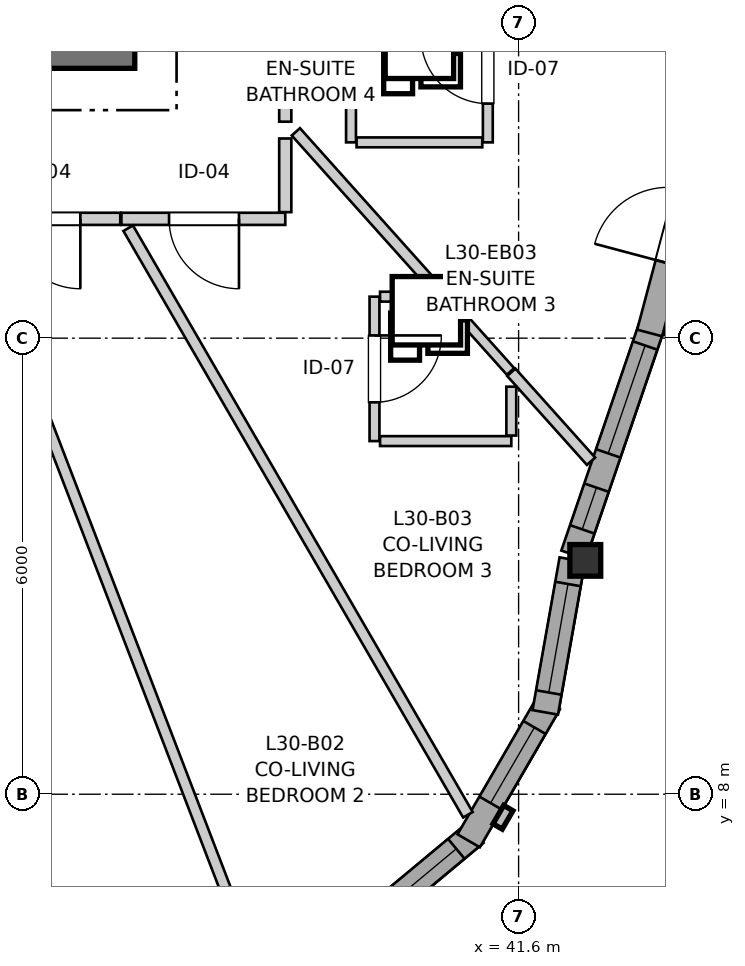
"""IFC4 building model, lengths in metres.
Left out: names, types, materials, properties, quantities, classifications, styles, units other than length and angle.
Written with IfcOpenShell. Run it as: python <this file> out.ifc"""

import sys

from ifc_helpers import new_model, si_unit, direction, frame, frame_2d, origin, origin_2d, place, context, subcontext, project, spatial, rectangle, i_section, extrude, source, transform, mapped, element, fill, save


model = new_model("IFC4")
c1 = context("Model", 3, precision=1e-05, world=origin(), true_north=direction((0.0, 1.0)))
c2 = subcontext(c1, "Body", "Model", "MODEL_VIEW")
j1 = project(units=[si_unit("LENGTHUNIT", "METRE"), si_unit("PLANEANGLEUNIT", "RADIAN")], contexts=[c1])
p1 = place(None, origin())
s1 = spatial("IfcSite", under=j1, at=p1, CompositionType="ELEMENT")
p2 = place(p1, origin())
s2 = spatial("IfcBuilding", under=s1, at=p2, CompositionType="ELEMENT")
p3 = place(p2, frame((0.0, 0.0, 102.4)))
s3 = spatial("IfcBuildingStorey", under=s2, at=p3, CompositionType="ELEMENT", Elevation=102.4)
p4 = place(p3, frame((24.15, 17.875, 0.0), z_axis=(0.0, 0.0, 1.0), x_axis=(1.0, 0.0, 0.0)))
e1 = element("IfcWall", 1, at=p4, inside=s3, PredefinedType="SHEAR", context=c2, shape_type="SweptSolid", body=[
    extrude(rectangle(XDim=12.4, YDim=0.65, at=frame_2d((6.2, 0.0))), origin(), (0.0, 0.0, 1.0), 2.95),
])
m1 = source(origin(), c2, "Body", "SweptSolid", [
    extrude(i_section(OverallWidth=0.406, OverallDepth=0.416, WebThickness=0.027, FlangeThickness=0.044, FilletRadius=0.015, at=origin_2d()), origin(), (0.0, 0.0, 1.0), 2.95),
])
p5 = place(p3, frame((42.478, 11.077, 0.0), z_axis=(0.0, 0.0, 1.0), x_axis=(1.0, 0.0, 0.0)))
e2 = element("IfcColumn", 2, at=p5, inside=s3, PredefinedType="PILASTER", context=c2, shape_type="MappedRepresentation", body=[
    mapped(m1, transform((0.0, 0.0, 0.0), x_axis=(1.0, 0.0, 0.0), y_axis=(0.0, 1.0, 0.0), z_axis=(0.0, 0.0, 1.0), scale=1.0)),
])
p6 = place(p3, frame((39.417, 6.147, 0.0), z_axis=(0.0, 0.0, 1.0), x_axis=(0.768497696041, 0.639852554249, 0.0)))
e3 = element("IfcWall", 3, at=p6, inside=s3, PredefinedType="SOLIDWALL", context=c2, shape_type="SweptSolid", body=[
    extrude(rectangle(XDim=2.099, YDim=0.34, at=frame_2d((1.049, 0.0))), origin(), (0.0, 0.0, 1.0), 2.48),
])
p7 = place(p6, frame((0.324, 0.0, 0.82)))
e4 = element("IfcOpeningElement", 4, at=p7, cuts=e3, PredefinedType="OPENING", context=c2, shape_type="SweptSolid", body=[
    extrude(rectangle(XDim=1.45, YDim=1.25, at=frame_2d((0.725, 0.625))), frame((0.0, 0.18, 0.0), z_axis=(0.0, -1.0, 0.0), x_axis=(1.0, 0.0, 0.0)), (0.0, 0.0, 1.0), 0.36),
])
p8 = place(p3, frame((40.943, 7.387, 0.0), z_axis=(0.0, 0.0, 1.0), x_axis=(0.501902596059, 0.864924149315, 0.0)))
e5 = element("IfcWall", 5, at=p8, inside=s3, PredefinedType="SOLIDWALL", context=c2, shape_type="SweptSolid", body=[
    extrude(rectangle(XDim=2.099, YDim=0.34, at=frame_2d((1.049, 0.0))), origin(), (0.0, 0.0, 1.0), 2.48),
])
p9 = place(p8, frame((0.574, 0.0, 0.82)))
e6 = element("IfcOpeningElement", 6, at=p9, cuts=e5, PredefinedType="OPENING", context=c2, shape_type="SweptSolid", body=[
    extrude(rectangle(XDim=1.15, YDim=1.2, at=frame_2d((0.575, 0.6))), frame((0.0, 0.18, 0.0), z_axis=(0.0, -1.0, 0.0), x_axis=(1.0, 0.0, 0.0)), (0.0, 0.0, 1.0), 0.36),
])
p10 = place(p3, frame((41.951, 9.077, 0.0), z_axis=(0.0, 0.0, 1.0), x_axis=(0.174399433509, 0.984674990843, 0.0)))
e7 = element("IfcWall", 7, at=p10, inside=s3, PredefinedType="SOLIDWALL", context=c2, shape_type="SweptSolid", body=[
    extrude(rectangle(XDim=2.041, YDim=0.34, at=frame_2d((1.021, 0.0))), origin(), (0.0, 0.0, 1.0), 2.48),
])
p11 = place(p10, frame((0.265, 0.0, 0.82)))
e8 = element("IfcOpeningElement", 8, at=p11, cuts=e7, PredefinedType="OPENING", context=c2, shape_type="SweptSolid", body=[
    extrude(rectangle(XDim=1.45, YDim=1.25, at=frame_2d((0.725, 0.625))), frame((0.0, 0.18, 0.0), z_axis=(0.0, -1.0, 0.0), x_axis=(1.0, 0.0, 0.0)), (0.0, 0.0, 1.0), 0.36),
])
p12 = place(p3, frame((42.323, 11.151, 0.0), z_axis=(0.0, 0.0, 1.0), x_axis=(0.323606092462, 0.94619189223, 0.0)))
e9 = element("IfcWall", 9, at=p12, inside=s3, PredefinedType="SOLIDWALL", context=c2, shape_type="SweptSolid", body=[
    extrude(rectangle(XDim=3.172, YDim=0.34, at=frame_2d((1.586, 0.0))), origin(), (0.0, 0.0, 1.0), 2.48),
])
p13 = place(p12, frame((0.353, 0.0, 0.82)))
e10 = element("IfcOpeningElement", 10, at=p13, cuts=e9, PredefinedType="OPENING", context=c2, shape_type="SweptSolid", body=[
    extrude(rectangle(XDim=0.58, YDim=1.35, at=frame_2d((0.29, 0.675))), frame((0.0, 0.18, 0.0), z_axis=(0.0, -1.0, 0.0), x_axis=(1.0, 0.0, 0.0)), (0.0, 0.0, 1.0), 0.36),
])
p14 = place(p12, frame((1.41, 0.0, 0.82)))
e11 = element("IfcOpeningElement", 11, at=p14, cuts=e9, PredefinedType="OPENING", context=c2, shape_type="SweptSolid", body=[
    extrude(rectangle(XDim=1.5, YDim=1.45, at=frame_2d((0.75, 0.725))), frame((0.0, 0.18, 0.0), z_axis=(0.0, -1.0, 0.0), x_axis=(1.0, 0.0, 0.0)), (0.0, 0.0, 1.0), 0.36),
])
p15 = place(p3, frame((43.324, 14.068, 0.0), z_axis=(0.0, 0.0, 1.0), x_axis=(0.257085513118, 0.966388658328, 0.0)))
e12 = element("IfcWall", 12, at=p15, inside=s3, PredefinedType="SOLIDWALL", context=c2, shape_type="SweptSolid", body=[
    extrude(rectangle(XDim=2.896, YDim=0.34, at=frame_2d((1.448, 0.0))), origin(), (0.0, 0.0, 1.0), 2.48),
])
p16 = place(p15, frame((0.948, 0.0, 0.0)))
e13 = element("IfcOpeningElement", 13, at=p16, cuts=e12, PredefinedType="OPENING", context=c2, shape_type="SweptSolid", body=[
    extrude(rectangle(XDim=1.0, YDim=2.1, at=frame_2d((0.5, 1.05))), frame((0.0, 0.18, 0.0), z_axis=(0.0, -1.0, 0.0), x_axis=(1.0, 0.0, 0.0)), (0.0, 0.0, 1.0), 0.36),
])
p17 = place(p3, frame((38.53, 23.005, 0.0), z_axis=(0.0, 0.0, 1.0), x_axis=(0.0, -1.0, 0.0)))
e14 = element("IfcWall", 14, at=p17, inside=s3, PredefinedType="PARTITIONING", context=c2, shape_type="SweptSolid", body=[
    extrude(rectangle(XDim=6.157, YDim=0.16, at=frame_2d((3.079, 0.0))), origin(), (0.0, 0.0, 1.0), 2.95),
])
p18 = place(p17, frame((2.615, 0.0, 0.0)))
e15 = element("IfcOpeningElement", 15, at=p18, cuts=e14, PredefinedType="OPENING", context=c2, shape_type="SweptSolid", body=[
    extrude(rectangle(XDim=0.92, YDim=2.1, at=frame_2d((0.46, 1.05))), frame((0.0, 0.09, 0.0), z_axis=(0.0, -1.0, 0.0), x_axis=(1.0, 0.0, 0.0)), (0.0, 0.0, 1.0), 0.18),
])
p19 = place(p3, frame((38.53, 15.57, 0.0), z_axis=(0.0, 0.0, 1.0), x_axis=(-1.0, 0.0, 0.0)))
e16 = element("IfcWall", 16, at=p19, inside=s3, PredefinedType="PARTITIONING", context=c2, shape_type="SweptSolid", body=[
    extrude(rectangle(XDim=2.156, YDim=0.16, at=frame_2d((1.078, 0.0))), origin(), (0.0, 0.0, 1.0), 2.95),
])
p20 = place(p19, frame((0.609, 0.0, 0.0)))
e17 = element("IfcOpeningElement", 17, at=p20, cuts=e16, PredefinedType="OPENING", context=c2, shape_type="SweptSolid", body=[
    extrude(rectangle(XDim=0.92, YDim=2.1, at=frame_2d((0.46, 1.05))), frame((0.0, 0.09, 0.0), z_axis=(0.0, -1.0, 0.0), x_axis=(1.0, 0.0, 0.0)), (0.0, 0.0, 1.0), 0.18),
])
p21 = place(p3, frame((36.359, 15.57, 0.0), z_axis=(0.0, 0.0, 1.0), x_axis=(-1.0, 0.0, 0.0)))
e18 = element("IfcWall", 18, at=p21, inside=s3, PredefinedType="PARTITIONING", context=c2, shape_type="SweptSolid", body=[
    extrude(rectangle(XDim=1.971, YDim=0.16, at=frame_2d((0.985, 0.0))), origin(), (0.0, 0.0, 1.0), 2.95),
])
p22 = place(p21, frame((0.525, 0.0, 0.0)))
e19 = element("IfcOpeningElement", 19, at=p22, cuts=e18, PredefinedType="OPENING", context=c2, shape_type="SweptSolid", body=[
    extrude(rectangle(XDim=0.92, YDim=2.1, at=frame_2d((0.46, 1.05))), frame((0.0, 0.09, 0.0), z_axis=(0.0, -1.0, 0.0), x_axis=(1.0, 0.0, 0.0)), (0.0, 0.0, 1.0), 0.18),
])
p23 = place(p3, frame((39.704, 14.546, 0.0), z_axis=(0.0, 0.0, 1.0), x_axis=(0.0, -1.0, 0.0)))
e20 = element("IfcWall", 20, at=p23, inside=s3, PredefinedType="PARTITIONING", context=c2, shape_type="SweptSolid", body=[
    extrude(rectangle(XDim=1.9, YDim=0.13, at=frame_2d((0.95, 0.0))), origin(), (0.0, 0.0, 1.0), 2.95),
])
p24 = place(p23, frame((0.51, 0.0, 0.0)))
e21 = element("IfcOpeningElement", 21, at=p24, cuts=e20, PredefinedType="OPENING", context=c2, shape_type="SweptSolid", body=[
    extrude(rectangle(XDim=0.88, YDim=2.05, at=frame_2d((0.44, 1.025))), frame((0.0, 0.075, 0.0), z_axis=(0.0, -1.0, 0.0), x_axis=(1.0, 0.0, 0.0)), (0.0, 0.0, 1.0), 0.15),
])
p25 = place(p3, frame((41.195, 16.576, 0.0), z_axis=(0.0, 0.0, 1.0), x_axis=(0.0, 1.0, 0.0)))
e22 = element("IfcWall", 22, at=p25, inside=s3, PredefinedType="PARTITIONING", context=c2, shape_type="SweptSolid", body=[
    extrude(rectangle(XDim=1.9, YDim=0.13, at=frame_2d((0.95, 0.0))), origin(), (0.0, 0.0, 1.0), 2.95),
])
p26 = place(p25, frame((0.51, 0.0, 0.0)))
e23 = element("IfcOpeningElement", 23, at=p26, cuts=e22, PredefinedType="OPENING", context=c2, shape_type="SweptSolid", body=[
    extrude(rectangle(XDim=0.88, YDim=2.05, at=frame_2d((0.44, 1.025))), frame((0.0, 0.075, 0.0), z_axis=(0.0, -1.0, 0.0), x_axis=(1.0, 0.0, 0.0)), (0.0, 0.0, 1.0), 0.15),
])
p27 = place(p3, frame((34.4, 15.457, 0.0), z_axis=(0.0, 0.0, 1.0), x_axis=(0.358586620169, -0.933496457324, 0.0)))
e24 = element("IfcWall", 24, at=p27, inside=s3, PredefinedType="PARTITIONING", context=c2, shape_type="SweptSolid", body=[
    extrude(rectangle(XDim=10.256, YDim=0.145, at=frame_2d((5.128, 0.0))), origin(), (0.0, 0.0, 1.0), 2.95),
])
p28 = place(p3, frame((36.463, 15.447, 0.0), z_axis=(0.0, 0.0, 1.0), x_axis=(0.501201369888, -0.86533068062, 0.0)))
e25 = element("IfcWall", 25, at=p28, inside=s3, PredefinedType="PARTITIONING", context=c2, shape_type="SweptSolid", body=[
    extrude(rectangle(XDim=8.918, YDim=0.145, at=frame_2d((4.459, 0.0))), origin(), (0.0, 0.0, 1.0), 2.95),
])
p29 = place(p3, frame((38.669, 16.715, 0.0), z_axis=(0.0, 0.0, 1.0), x_axis=(0.667262858083, -0.744822313188, 0.0)))
e26 = element("IfcWall", 26, at=p29, inside=s3, PredefinedType="PARTITIONING", context=c2, shape_type="SweptSolid", body=[
    extrude(rectangle(XDim=2.912, YDim=0.145, at=frame_2d((1.456, 0.0))), origin(), (0.0, 0.0, 1.0), 2.95),
])
p30 = place(p3, frame((39.395, 16.576, 0.0), z_axis=(0.0, 0.0, 1.0), x_axis=(0.0, 1.0, 0.0)))
e27 = element("IfcWall", 27, at=p30, inside=s3, PredefinedType="PARTITIONING", context=c2, shape_type="SweptSolid", body=[
    extrude(rectangle(XDim=1.9, YDim=0.13, at=frame_2d((0.95, 0.0))), origin(), (0.0, 0.0, 1.0), 2.95),
])
p31 = place(p3, frame((39.777, 12.646, 0.0), z_axis=(0.0, 0.0, 1.0), x_axis=(1.0, 0.0, 0.0)))
e28 = element("IfcWall", 28, at=p31, inside=s3, PredefinedType="PARTITIONING", context=c2, shape_type="SweptSolid", body=[
    extrude(rectangle(XDim=1.727, YDim=0.13, at=frame_2d((0.863, 0.0))), origin(), (0.0, 0.0, 1.0), 2.95),
])
p32 = place(p3, frame((39.468, 16.576, 0.0), z_axis=(0.0, 0.0, 1.0), x_axis=(1.0, 0.0, 0.0)))
e29 = element("IfcWall", 29, at=p32, inside=s3, PredefinedType="PARTITIONING", context=c2, shape_type="SweptSolid", body=[
    extrude(rectangle(XDim=1.654, YDim=0.13, at=frame_2d((0.827, 0.0))), origin(), (0.0, 0.0, 1.0), 2.95),
])
p33 = place(p3, frame((41.504, 13.551, 0.0), z_axis=(0.0, 0.0, 1.0), x_axis=(0.667530166935, -0.744582753112, 0.0)))
e30 = element("IfcWall", 30, at=p33, inside=s3, PredefinedType="PARTITIONING", context=c2, shape_type="SweptSolid", body=[
    extrude(rectangle(XDim=1.572, YDim=0.145, at=frame_2d((0.786, 0.0))), origin(), (0.0, 0.0, 1.0), 2.95),
])
p34 = place(p3, frame((40.622, 14.535, 0.0), z_axis=(0.0, 0.0, 1.0), x_axis=(0.667455683483, -0.744649521981, 0.0)))
e31 = element("IfcWall", 31, at=p34, inside=s3, PredefinedType="PARTITIONING", context=c2, shape_type="SweptSolid", body=[
    extrude(rectangle(XDim=1.306, YDim=0.13, at=frame_2d((0.653, 0.0))), origin(), (0.0, 0.0, 1.0), 2.95),
])
p35 = place(p3, frame((38.53, 15.658, 0.0), z_axis=(0.0, 0.0, 1.0), x_axis=(0.0, 1.0, 0.0)))
e32 = element("IfcWall", 32, at=p35, inside=s3, PredefinedType="PARTITIONING", context=c2, shape_type="SweptSolid", body=[
    extrude(rectangle(XDim=0.969, YDim=0.16, at=frame_2d((0.484, 0.0))), origin(), (0.0, 0.0, 1.0), 2.95),
])
p36 = place(p3, frame((39.777, 14.546, 0.0), z_axis=(0.0, 0.0, 1.0), x_axis=(1.0, 0.0, 0.0)))
e33 = element("IfcWall", 33, at=p36, inside=s3, PredefinedType="PARTITIONING", context=c2, shape_type="SweptSolid", body=[
    extrude(rectangle(XDim=0.671, YDim=0.13, at=frame_2d((0.336, 0.0))), origin(), (0.0, 0.0, 1.0), 2.95),
])
p37 = place(p3, frame((41.504, 12.719, 0.0), z_axis=(0.0, 0.0, 1.0), x_axis=(0.0, 1.0, 0.0)))
e34 = element("IfcWall", 34, at=p37, inside=s3, PredefinedType="PARTITIONING", context=c2, shape_type="SweptSolid", body=[
    extrude(rectangle(XDim=0.643, YDim=0.13, at=frame_2d((0.321, 0.0))), origin(), (0.0, 0.0, 1.0), 2.95),
])
m2 = source(origin(), c2, "Body", "SweptSolid", [
    extrude(rectangle(XDim=1.45, YDim=1.25, at=frame_2d((0.725, 0.625))), frame((0.0, 0.03, 0.0), z_axis=(0.0, -1.0, 0.0), x_axis=(1.0, 0.0, 0.0)), (0.0, 0.0, 1.0), 0.06),
])
p38 = place(p7, origin())
e35 = element("IfcWindow", 35, at=p38, inside=s3, PartitioningType="SINGLE_PANEL", PredefinedType="WINDOW", context=c2, shape_type="MappedRepresentation", body=[
    mapped(m2, transform((0.0, 0.0, 0.0), x_axis=(1.0, 0.0, 0.0), y_axis=(0.0, 1.0, 0.0), z_axis=(0.0, 0.0, 1.0), scale=1.0)),
])
fill(e4, e35)
m3 = source(origin(), c2, "Body", "SweptSolid", [
    extrude(rectangle(XDim=1.15, YDim=1.2, at=frame_2d((0.575, 0.6))), frame((0.0, 0.03, 0.0), z_axis=(0.0, -1.0, 0.0), x_axis=(1.0, 0.0, 0.0)), (0.0, 0.0, 1.0), 0.06),
])
p39 = place(p9, origin())
e36 = element("IfcWindow", 36, at=p39, inside=s3, PartitioningType="SINGLE_PANEL", PredefinedType="WINDOW", context=c2, shape_type="MappedRepresentation", body=[
    mapped(m3, transform((0.0, 0.0, 0.0), x_axis=(1.0, 0.0, 0.0), y_axis=(0.0, 1.0, 0.0), z_axis=(0.0, 0.0, 1.0), scale=1.0)),
])
fill(e6, e36)
p40 = place(p11, origin())
e37 = element("IfcWindow", 37, at=p40, inside=s3, PartitioningType="SINGLE_PANEL", PredefinedType="WINDOW", context=c2, shape_type="MappedRepresentation", body=[
    mapped(m2, transform((0.0, 0.0, 0.0), x_axis=(1.0, 0.0, 0.0), y_axis=(0.0, 1.0, 0.0), z_axis=(0.0, 0.0, 1.0), scale=1.0)),
])
fill(e8, e37)
m4 = source(origin(), c2, "Body", "SweptSolid", [
    extrude(rectangle(XDim=0.58, YDim=1.35, at=frame_2d((0.29, 0.675))), frame((0.0, 0.03, 0.0), z_axis=(0.0, -1.0, 0.0), x_axis=(1.0, 0.0, 0.0)), (0.0, 0.0, 1.0), 0.06),
])
p41 = place(p13, origin())
e38 = element("IfcWindow", 38, at=p41, inside=s3, PartitioningType="SINGLE_PANEL", PredefinedType="WINDOW", context=c2, shape_type="MappedRepresentation", body=[
    mapped(m4, transform((0.0, 0.0, 0.0), x_axis=(1.0, 0.0, 0.0), y_axis=(0.0, 1.0, 0.0), z_axis=(0.0, 0.0, 1.0), scale=1.0)),
])
fill(e10, e38)
m5 = source(origin(), c2, "Body", "SweptSolid", [
    extrude(rectangle(XDim=1.5, YDim=1.45, at=frame_2d((0.75, 0.725))), frame((0.0, 0.03, 0.0), z_axis=(0.0, -1.0, 0.0), x_axis=(1.0, 0.0, 0.0)), (0.0, 0.0, 1.0), 0.06),
])
p42 = place(p14, origin())
e39 = element("IfcWindow", 39, at=p42, inside=s3, PartitioningType="SINGLE_PANEL", PredefinedType="WINDOW", context=c2, shape_type="MappedRepresentation", body=[
    mapped(m5, transform((0.0, 0.0, 0.0), x_axis=(1.0, 0.0, 0.0), y_axis=(0.0, 1.0, 0.0), z_axis=(0.0, 0.0, 1.0), scale=1.0)),
])
fill(e11, e39)
m6 = source(origin(), c2, "Body", "SweptSolid", [
    extrude(rectangle(XDim=0.92, YDim=2.1, at=frame_2d((0.46, 1.05))), frame((0.0, 0.025, 0.0), z_axis=(0.0, -1.0, 0.0), x_axis=(1.0, 0.0, 0.0)), (0.0, 0.0, 1.0), 0.05),
])
p43 = place(p20, origin())
e40 = element("IfcDoor", 40, at=p43, inside=s3, OperationType="SINGLE_SWING_LEFT", PredefinedType="DOOR", context=c2, shape_type="MappedRepresentation", body=[
    mapped(m6, transform((0.0, 0.0, 0.0), x_axis=(1.0, 0.0, 0.0), y_axis=(0.0, 1.0, 0.0), z_axis=(0.0, 0.0, 1.0), scale=1.0)),
])
fill(e17, e40)
p44 = place(p22, origin())
e41 = element("IfcDoor", 41, at=p44, inside=s3, OperationType="SINGLE_SWING_LEFT", PredefinedType="DOOR", context=c2, shape_type="MappedRepresentation", body=[
    mapped(m6, transform((0.0, 0.0, 0.0), x_axis=(1.0, 0.0, 0.0), y_axis=(0.0, 1.0, 0.0), z_axis=(0.0, 0.0, 1.0), scale=1.0)),
])
fill(e19, e41)
m7 = source(origin(), c2, "Body", "SweptSolid", [
    extrude(rectangle(XDim=0.88, YDim=2.05, at=frame_2d((0.44, 1.025))), frame((0.0, 0.025, 0.0), z_axis=(0.0, -1.0, 0.0), x_axis=(1.0, 0.0, 0.0)), (0.0, 0.0, 1.0), 0.05),
])
p45 = place(p24, origin())
e42 = element("IfcDoor", 42, at=p45, inside=s3, OperationType="SINGLE_SWING_LEFT", PredefinedType="DOOR", context=c2, shape_type="MappedRepresentation", body=[
    mapped(m7, transform((0.0, 0.0, 0.0), x_axis=(1.0, 0.0, 0.0), y_axis=(0.0, 1.0, 0.0), z_axis=(0.0, 0.0, 1.0), scale=1.0)),
])
fill(e21, e42)
p46 = place(p26, origin())
e43 = element("IfcDoor", 43, at=p46, inside=s3, OperationType="SINGLE_SWING_RIGHT", PredefinedType="DOOR", context=c2, shape_type="MappedRepresentation", body=[
    mapped(m7, transform((0.0, 0.0, 0.0), x_axis=(1.0, 0.0, 0.0), y_axis=(0.0, 1.0, 0.0), z_axis=(0.0, 0.0, 1.0), scale=1.0)),
])
fill(e23, e43)
save(model, sys.argv[1])
